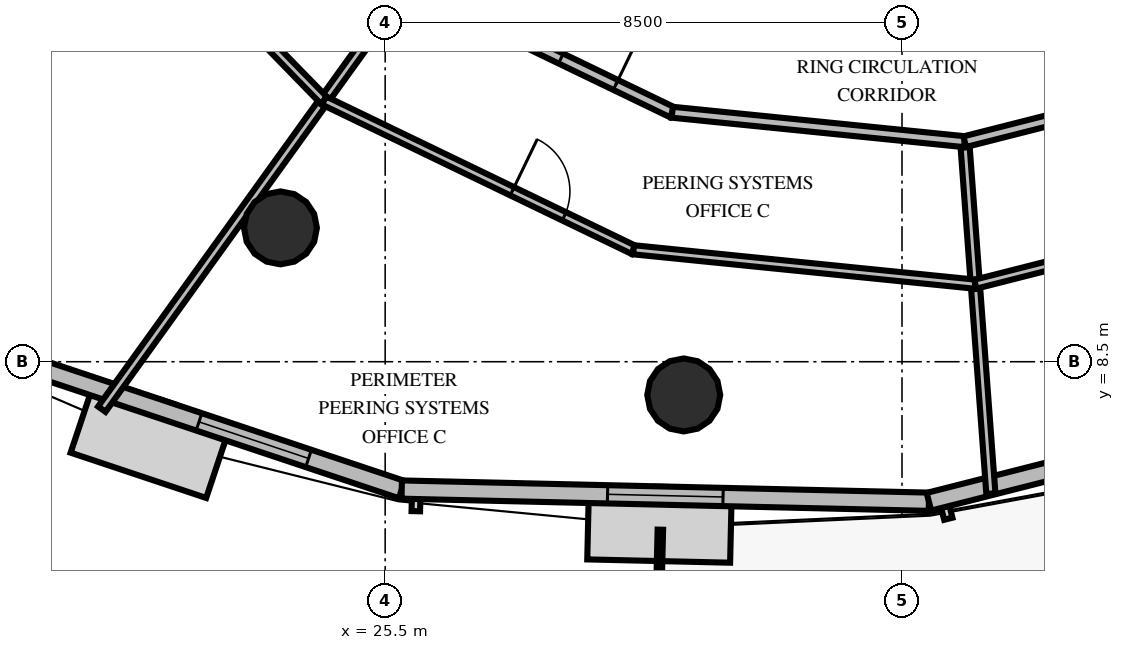
"""IFC4 building model, lengths in metres.
Left out: names, types, materials, properties, quantities, classifications, styles, units other than length and angle.
Written with IfcOpenShell. Run it as: python <this file> out.ifc"""

import sys

from ifc_helpers import new_model, si_unit, direction, frame, frame_2d, origin, origin_2d, place, context, subcontext, project, spatial, rectangle, circle, extrude, element, fill, save


model = new_model("IFC4")
c1 = context("Model", 3, precision=1e-05, world=origin(), true_north=direction((0.0, 1.0)))
c2 = subcontext(c1, "Body", "Model", "MODEL_VIEW")
j1 = project(units=[si_unit("LENGTHUNIT", "METRE"), si_unit("PLANEANGLEUNIT", "RADIAN")], contexts=[c1])
p1 = place(None, origin())
s1 = spatial("IfcSite", under=j1, at=p1, CompositionType="ELEMENT")
p2 = place(p1, origin())
s2 = spatial("IfcBuilding", under=s1, at=p2, CompositionType="ELEMENT")
p3 = place(p2, frame((0.0, 0.0, 93.8)))
s3 = spatial("IfcBuildingStorey", under=s2, at=p3, CompositionType="ELEMENT", Elevation=93.8)
for number, where, z_axis, x_axis in (
    (1, (23.778, 10.701, -0.28), (0.0, 0.0, 1.0), (1.0, 0.0, 0.0)),
    (2, (30.41, 7.954, -0.28), (0.0, 0.0, 1.0), (1.0, 0.0, 0.0)),
):
    element("IfcColumn", number, at=place(p3, frame(where, z_axis=z_axis, x_axis=x_axis)), inside=s3, PredefinedType="COLUMN", context=c2, shape_type="SweptSolid", body=[
        extrude(circle(Radius=0.6, at=origin_2d()), origin(), (0.0, 0.0, 1.0), 4.28),
    ])
p4 = place(p3, frame((18.094, 8.962, 0.0), z_axis=(0.0, 0.0, 1.0), x_axis=(0.948496147273, -0.316788665531, 0.0)))
e3 = element("IfcWall", 3, at=p4, inside=s3, PredefinedType="SOLIDWALL", context=c2, shape_type="SweptSolid", body=[
    extrude(rectangle(XDim=8.095, YDim=0.3, at=frame_2d((4.048, 0.0))), origin(), (0.0, 0.0, 1.0), 2.9),
])
p5 = place(p4, frame((4.58, 0.0, 0.8)))
e4 = element("IfcOpeningElement", 4, at=p5, cuts=e3, PredefinedType="OPENING", context=c2, shape_type="SweptSolid", body=[
    extrude(rectangle(XDim=1.9, YDim=1.95, at=frame_2d((0.95, 0.975))), frame((0.0, 0.16, 0.0), z_axis=(0.0, -1.0, 0.0), x_axis=(1.0, 0.0, 0.0)), (0.0, 0.0, 1.0), 0.32),
])
p6 = place(p3, frame((25.772, 6.397, 0.0), z_axis=(0.0, 0.0, 1.0), x_axis=(0.999734193594, -0.023055198078, 0.0)))
e5 = element("IfcWall", 5, at=p6, inside=s3, PredefinedType="SOLIDWALL", context=c2, shape_type="SweptSolid", body=[
    extrude(rectangle(XDim=8.673, YDim=0.3, at=frame_2d((4.336, 0.0))), origin(), (0.0, 0.0, 1.0), 2.9),
])
p7 = place(p6, frame((3.386, 0.0, 0.8)))
e6 = element("IfcOpeningElement", 6, at=p7, cuts=e5, PredefinedType="OPENING", context=c2, shape_type="SweptSolid", body=[
    extrude(rectangle(XDim=1.9, YDim=1.95, at=frame_2d((0.95, 0.975))), frame((0.0, 0.16, 0.0), z_axis=(0.0, -1.0, 0.0), x_axis=(1.0, 0.0, 0.0)), (0.0, 0.0, 1.0), 0.32),
])
p8 = place(p3, frame((34.443, 6.198, 0.0), z_axis=(0.0, 0.0, 1.0), x_axis=(0.969231185193, 0.246152208297, 0.0)))
e7 = element("IfcWall", 7, at=p8, inside=s3, PredefinedType="SOLIDWALL", context=c2, shape_type="SweptSolid", body=[
    extrude(rectangle(XDim=8.891, YDim=0.3, at=frame_2d((4.445, 0.0))), origin(), (0.0, 0.0, 1.0), 2.9),
])
p9 = place(p8, frame((6.75, 0.0, 0.0)))
e8 = element("IfcOpeningElement", 8, at=p9, cuts=e7, PredefinedType="OPENING", context=c2, shape_type="SweptSolid", body=[
    extrude(rectangle(XDim=1.05, YDim=2.15, at=frame_2d((0.525, 1.075))), frame((0.0, 0.16, 0.0), z_axis=(0.0, -1.0, 0.0), x_axis=(1.0, 0.0, 0.0)), (0.0, 0.0, 1.0), 0.32),
])
p10 = place(p3, frame((25.867, 14.703, 0.0), z_axis=(0.0, 0.0, 1.0), x_axis=(-0.584250909088, -0.811573086808, 0.0)))
e9 = element("IfcWall", 9, at=p10, inside=s3, PredefinedType="PARTITIONING", context=c2, shape_type="SweptSolid", body=[
    extrude(rectangle(XDim=8.605, YDim=0.15, at=frame_2d((4.302, 0.0))), origin(), (0.0, 0.0, 1.0), 2.8),
])
p11 = place(p3, frame((20.552, 16.843, 0.0), z_axis=(0.0, 0.0, 1.0), x_axis=(0.697778338801, -0.71631375102, 0.0)))
e10 = element("IfcWall", 10, at=p11, inside=s3, PredefinedType="PARTITIONING", context=c2, shape_type="SweptSolid", body=[
    extrude(rectangle(XDim=5.651, YDim=0.15, at=frame_2d((2.825, 0.0))), origin(), (0.0, 0.0, 1.0), 2.8),
])
p12 = place(p11, frame((2.35, 0.0, 0.0)))
e11 = element("IfcOpeningElement", 11, at=p12, cuts=e10, PredefinedType="OPENING", context=c2, shape_type="SweptSolid", body=[
    extrude(rectangle(XDim=0.95, YDim=2.15, at=frame_2d((0.475, 1.075))), frame((0.0, 0.085, 0.0), z_axis=(0.0, -1.0, 0.0), x_axis=(1.0, 0.0, 0.0)), (0.0, 0.0, 1.0), 0.17),
])
p13 = place(p3, frame((35.031, 12.118, 0.0), z_axis=(0.0, 0.0, 1.0), x_axis=(0.074122710033, -0.997249128281, 0.0)))
e12 = element("IfcWall", 12, at=p13, inside=s3, PredefinedType="PARTITIONING", context=c2, shape_type="SweptSolid", body=[
    extrude(rectangle(XDim=5.803, YDim=0.15, at=frame_2d((2.902, 0.0))), origin(), (0.0, 0.0, 1.0), 2.8),
])
p14 = place(p3, frame((25.867, 14.703, 0.0), z_axis=(0.0, 0.0, 1.0), x_axis=(0.900689994379, -0.434462350527, 0.0)))
e13 = element("IfcWall", 13, at=p14, inside=s3, PredefinedType="PARTITIONING", context=c2, shape_type="SweptSolid", body=[
    extrude(rectangle(XDim=4.834, YDim=0.18, at=frame_2d((2.417, 0.0))), origin(), (0.0, 0.0, 1.0), 2.8),
])
p15 = place(p14, frame((2.801, 0.0, 0.0)))
e14 = element("IfcOpeningElement", 14, at=p15, cuts=e13, PredefinedType="OPENING", context=c2, shape_type="SweptSolid", body=[
    extrude(rectangle(XDim=1.0, YDim=2.15, at=frame_2d((0.5, 1.075))), frame((0.0, 0.1, 0.0), z_axis=(0.0, -1.0, 0.0), x_axis=(1.0, 0.0, 0.0)), (0.0, 0.0, 1.0), 0.2),
])
p16 = place(p3, frame((30.221, 12.603, 0.0), z_axis=(0.0, 0.0, 1.0), x_axis=(0.994972982965, -0.100143712578, 0.0)))
e15 = element("IfcWall", 15, at=p16, inside=s3, PredefinedType="PARTITIONING", context=c2, shape_type="SweptSolid", body=[
    extrude(rectangle(XDim=4.834, YDim=0.18, at=frame_2d((2.417, 0.0))), origin(), (0.0, 0.0, 1.0), 2.8),
])
p17 = place(p3, frame((24.494, 12.796, 0.0), z_axis=(0.0, 0.0, 1.0), x_axis=(0.900696832222, -0.434448174614, 0.0)))
e16 = element("IfcWall", 16, at=p17, inside=s3, PredefinedType="PARTITIONING", context=c2, shape_type="SweptSolid", body=[
    extrude(rectangle(XDim=5.65, YDim=0.15, at=frame_2d((2.825, 0.0))), origin(), (0.0, 0.0, 1.0), 2.8),
])
p18 = place(p17, frame((3.435, 0.0, 0.0)))
e17 = element("IfcOpeningElement", 17, at=p18, cuts=e16, PredefinedType="OPENING", context=c2, shape_type="SweptSolid", body=[
    extrude(rectangle(XDim=0.95, YDim=2.15, at=frame_2d((0.475, 1.075))), frame((0.0, 0.085, 0.0), z_axis=(0.0, -1.0, 0.0), x_axis=(1.0, 0.0, 0.0)), (0.0, 0.0, 1.0), 0.17),
])
p19 = place(p3, frame((29.584, 10.341, 0.0), z_axis=(0.0, 0.0, 1.0), x_axis=(0.994967646776, -0.100196715862, 0.0)))
e18 = element("IfcWall", 18, at=p19, inside=s3, PredefinedType="PARTITIONING", context=c2, shape_type="SweptSolid", body=[
    extrude(rectangle(XDim=5.65, YDim=0.15, at=frame_2d((2.825, 0.0))), origin(), (0.0, 0.0, 1.0), 2.8),
])
p20 = place(p3, frame((35.031, 12.118, 0.0), z_axis=(0.0, 0.0, 1.0), x_axis=(0.969235741286, 0.246134267859, 0.0)))
e19 = element("IfcWall", 19, at=p20, inside=s3, PredefinedType="PARTITIONING", context=c2, shape_type="SweptSolid", body=[
    extrude(rectangle(XDim=4.834, YDim=0.18, at=frame_2d((2.417, 0.0))), origin(), (0.0, 0.0, 1.0), 2.8),
])
p21 = place(p20, frame((2.801, 0.0, 0.0)))
e20 = element("IfcOpeningElement", 20, at=p21, cuts=e19, PredefinedType="OPENING", context=c2, shape_type="SweptSolid", body=[
    extrude(rectangle(XDim=1.0, YDim=2.15, at=frame_2d((0.5, 1.075))), frame((0.0, 0.1, 0.0), z_axis=(0.0, -1.0, 0.0), x_axis=(1.0, 0.0, 0.0)), (0.0, 0.0, 1.0), 0.2),
])
p22 = place(p3, frame((35.206, 9.775, 0.0), z_axis=(0.0, 0.0, 1.0), x_axis=(0.969230932857, 0.246153201876, 0.0)))
e21 = element("IfcWall", 21, at=p22, inside=s3, PredefinedType="PARTITIONING", context=c2, shape_type="SweptSolid", body=[
    extrude(rectangle(XDim=5.65, YDim=0.15, at=frame_2d((2.825, 0.0))), origin(), (0.0, 0.0, 1.0), 2.8),
])
p23 = place(p22, frame((3.435, 0.0, 0.0)))
e22 = element("IfcOpeningElement", 22, at=p23, cuts=e21, PredefinedType="OPENING", context=c2, shape_type="SweptSolid", body=[
    extrude(rectangle(XDim=0.95, YDim=2.15, at=frame_2d((0.475, 1.075))), frame((0.0, 0.085, 0.0), z_axis=(0.0, -1.0, 0.0), x_axis=(1.0, 0.0, 0.0)), (0.0, 0.0, 1.0), 0.17),
])
p24 = place(p5, origin())
e23 = element("IfcWindow", 23, at=p24, inside=s3, PartitioningType="SINGLE_PANEL", PredefinedType="WINDOW", context=c2, shape_type="SweptSolid", body=[
    extrude(rectangle(XDim=1.9, YDim=1.95, at=frame_2d((0.95, 0.975))), frame((0.0, 0.03, 0.0), z_axis=(0.0, -1.0, 0.0), x_axis=(1.0, 0.0, 0.0)), (0.0, 0.0, 1.0), 0.06),
])
fill(e4, e23)
p25 = place(p7, origin())
e24 = element("IfcWindow", 24, at=p25, inside=s3, PartitioningType="SINGLE_PANEL", PredefinedType="WINDOW", context=c2, shape_type="SweptSolid", body=[
    extrude(rectangle(XDim=1.9, YDim=1.95, at=frame_2d((0.95, 0.975))), frame((0.0, 0.03, 0.0), z_axis=(0.0, -1.0, 0.0), x_axis=(1.0, 0.0, 0.0)), (0.0, 0.0, 1.0), 0.06),
])
fill(e6, e24)
p26 = place(p15, origin())
e25 = element("IfcDoor", 25, at=p26, inside=s3, OperationType="SINGLE_SWING_RIGHT", PredefinedType="DOOR", context=c2, shape_type="SweptSolid", body=[
    extrude(rectangle(XDim=1.0, YDim=2.15, at=frame_2d((0.5, 1.075))), frame((0.0, 0.025, 0.0), z_axis=(0.0, -1.0, 0.0), x_axis=(1.0, 0.0, 0.0)), (0.0, 0.0, 1.0), 0.05),
])
fill(e14, e25)
p27 = place(p18, origin())
e26 = element("IfcDoor", 26, at=p27, inside=s3, OperationType="SINGLE_SWING_LEFT", PredefinedType="DOOR", context=c2, shape_type="SweptSolid", body=[
    extrude(rectangle(XDim=0.95, YDim=2.15, at=frame_2d((0.475, 1.075))), frame((0.0, 0.025, 0.0), z_axis=(0.0, -1.0, 0.0), x_axis=(1.0, 0.0, 0.0)), (0.0, 0.0, 1.0), 0.05),
])
fill(e17, e26)
save(model, sys.argv[1])
